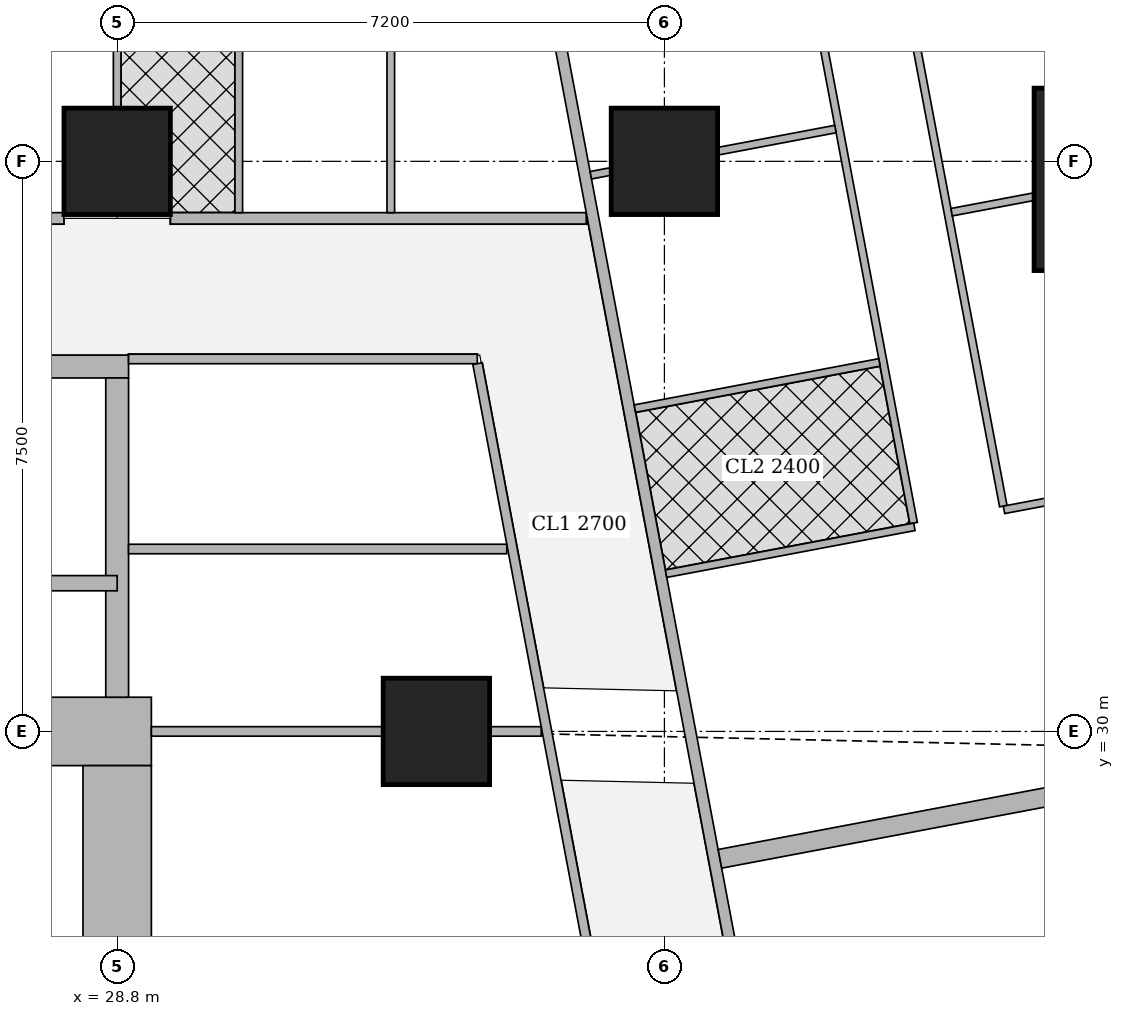
"""IFC4 building model, lengths in metres.
Left out: names, types, materials, properties, quantities, classifications, styles, units other than length and angle.
Written with IfcOpenShell. Run it as: python <this file> out.ifc"""

import sys

from ifc_helpers import new_model, si_unit, direction, frame, frame_2d, origin, origin_2d, place, context, subcontext, project, spatial, rectangle, extrude, element, fill, save


model = new_model("IFC4")
c1 = context("Model", 3, precision=1e-05, world=origin(), true_north=direction((0.0, 1.0)))
c2 = subcontext(c1, "Body", "Model", "MODEL_VIEW")
j1 = project(units=[si_unit("LENGTHUNIT", "METRE"), si_unit("PLANEANGLEUNIT", "RADIAN")], contexts=[c1])
p1 = place(None, origin())
s1 = spatial("IfcSite", under=j1, at=p1, CompositionType="ELEMENT")
p2 = place(p1, origin())
s2 = spatial("IfcBuilding", under=s1, at=p2, CompositionType="ELEMENT")
p3 = place(p2, frame((0.0, 0.0, 234.95)))
s3 = spatial("IfcBuildingStorey", under=s2, at=p3, CompositionType="ELEMENT", Elevation=234.95)
for number, where, z_axis, x_axis in (
    (1, (33.0, 30.0, 0.0), (0.0, 0.0, 1.0), (1.0, 0.0, 0.0)),
    (2, (28.8, 37.5, 0.0), (0.0, 0.0, 1.0), (1.0, 0.0, 0.0)),
    (3, (36.0, 37.5, 0.0), (0.0, 0.0, 1.0), (1.0, 0.0, 0.0)),
):
    element("IfcColumn", number, at=place(p3, frame(where, z_axis=z_axis, x_axis=x_axis)), inside=s3, PredefinedType="COLUMN", context=c2, shape_type="SweptSolid", body=[
        extrude(rectangle(XDim=1.4, YDim=1.4, at=origin_2d()), origin(), (0.0, 0.0, 1.0), 3.75),
    ])
p4 = place(p3, frame((42.064, 37.263, 0.0), z_axis=(0.0, 0.0, 1.0), x_axis=(1.0, 0.0, 0.0)))
e4 = element("IfcColumn", 4, at=p4, inside=s3, PredefinedType="COLUMN", context=c2, shape_type="SweptSolid", body=[
    extrude(rectangle(XDim=2.4, YDim=2.4, at=origin_2d()), origin(), (0.0, 0.0, 1.0), 3.75),
])
p5 = place(p3, frame((13.95, 30.0, 0.0), z_axis=(0.0, 0.0, 1.0), x_axis=(1.0, 0.0, 0.0)))
e5 = element("IfcWall", 5, at=p5, inside=s3, PredefinedType="SHEAR", context=c2, shape_type="SweptSolid", body=[
    extrude(rectangle(XDim=15.3, YDim=0.9, at=frame_2d((7.65, 0.0))), origin(), (0.0, 0.0, 1.0), 3.75),
])
p6 = place(p5, frame((4.45, 0.0, 0.0)))
e6 = element("IfcOpeningElement", 6, at=p6, cuts=e5, PredefinedType="OPENING", context=c2, shape_type="SweptSolid", body=[
    extrude(rectangle(XDim=1.8, YDim=2.1, at=frame_2d((0.9, 1.05))), frame((0.0, 0.46, 0.0), z_axis=(0.0, -1.0, 0.0), x_axis=(1.0, 0.0, 0.0)), (0.0, 0.0, 1.0), 0.92),
])
p7 = place(p5, frame((10.7, 0.0, 0.0)))
e7 = element("IfcOpeningElement", 7, at=p7, cuts=e5, PredefinedType="OPENING", context=c2, shape_type="SweptSolid", body=[
    extrude(rectangle(XDim=1.1, YDim=2.1, at=frame_2d((0.55, 1.05))), frame((0.0, 0.46, 0.0), z_axis=(0.0, -1.0, 0.0), x_axis=(1.0, 0.0, 0.0)), (0.0, 0.0, 1.0), 0.92),
])
p8 = place(p3, frame((28.8, 15.45, 0.0), z_axis=(0.0, 0.0, 1.0), x_axis=(0.0, 1.0, 0.0)))
e8 = element("IfcWall", 8, at=p8, inside=s3, PredefinedType="SHEAR", context=c2, shape_type="SweptSolid", body=[
    extrude(rectangle(XDim=14.1, YDim=0.9, at=frame_2d((7.05, 0.0))), origin(), (0.0, 0.0, 1.0), 3.75),
])
p9 = place(p3, frame((21.45, 34.8, 0.0), z_axis=(0.0, 0.0, 1.0), x_axis=(1.0, 0.0, 0.0)))
e9 = element("IfcWall", 9, at=p9, inside=s3, PredefinedType="SHEAR", context=c2, shape_type="SweptSolid", body=[
    extrude(rectangle(XDim=7.5, YDim=0.3, at=frame_2d((3.75, 0.0))), origin(), (0.0, 0.0, 1.0), 3.75),
])
p10 = place(p9, frame((0.5, 0.0, 0.0)))
e10 = element("IfcOpeningElement", 10, at=p10, cuts=e9, PredefinedType="OPENING", context=c2, shape_type="SweptSolid", body=[
    extrude(rectangle(XDim=1.1, YDim=2.1, at=frame_2d((0.55, 1.05))), frame((0.0, 0.16, 0.0), z_axis=(0.0, -1.0, 0.0), x_axis=(1.0, 0.0, 0.0)), (0.0, 0.0, 1.0), 0.32),
])
p11 = place(p3, frame((28.8, 30.45, 0.0), z_axis=(0.0, 0.0, 1.0), x_axis=(0.0, 1.0, 0.0)))
e11 = element("IfcWall", 11, at=p11, inside=s3, PredefinedType="SHEAR", context=c2, shape_type="SweptSolid", body=[
    extrude(rectangle(XDim=4.2, YDim=0.3, at=frame_2d((2.1, 0.0))), origin(), (0.0, 0.0, 1.0), 3.75),
])
p12 = place(p3, frame((22.301, 36.75, 0.0), z_axis=(0.0, 0.0, 1.0), x_axis=(1.0, 0.0, 0.0)))
e12 = element("IfcWall", 12, at=p12, inside=s3, PredefinedType="SOLIDWALL", context=c2, shape_type="SweptSolid", body=[
    extrude(rectangle(XDim=5.798, YDim=0.15, at=frame_2d((2.899, 0.0))), origin(), (0.0, 0.0, 1.0), 3.5),
])
p13 = place(p12, frame((0.799, 0.0, 0.0)))
e13 = element("IfcOpeningElement", 13, at=p13, cuts=e12, PredefinedType="OPENING", context=c2, shape_type="SweptSolid", body=[
    extrude(rectangle(XDim=1.0, YDim=2.1, at=frame_2d((0.5, 1.05))), frame((0.0, 0.085, 0.0), z_axis=(0.0, -1.0, 0.0), x_axis=(1.0, 0.0, 0.0)), (0.0, 0.0, 1.0), 0.17),
])
p14 = place(p3, frame((29.501, 36.75, 0.0), z_axis=(0.0, 0.0, 1.0), x_axis=(1.0, 0.0, 0.0)))
e14 = element("IfcWall", 14, at=p14, inside=s3, PredefinedType="SOLIDWALL", context=c2, shape_type="SweptSolid", body=[
    extrude(rectangle(XDim=5.471, YDim=0.15, at=frame_2d((2.735, 0.0))), origin(), (0.0, 0.0, 1.0), 3.5),
])
p15 = place(p3, frame((33.933, 42.73, 0.0), z_axis=(0.0, 0.0, 1.0), x_axis=(0.185595417643, -0.982626246825, 0.0)))
e15 = element("IfcWall", 15, at=p15, inside=s3, PredefinedType="SOLIDWALL", context=c2, shape_type="SweptSolid", body=[
    extrude(rectangle(XDim=41.051, YDim=0.15, at=frame_2d((20.525, 0.0))), origin(), (0.0, 0.0, 1.0), 2.5),
])
p16 = place(p15, frame((12.266, 0.0, 0.0)))
e16 = element("IfcOpeningElement", 16, at=p16, cuts=e15, PredefinedType="OPENING", context=c2, shape_type="SweptSolid", body=[
    extrude(rectangle(XDim=1.0, YDim=2.1, at=frame_2d((0.5, 1.05))), frame((0.0, 0.085, 0.0), z_axis=(0.0, -1.0, 0.0), x_axis=(1.0, 0.0, 0.0)), (0.0, 0.0, 1.0), 0.17),
])
p17 = place(p15, frame((16.082, 0.0, 0.0)))
e17 = element("IfcOpeningElement", 17, at=p17, cuts=e15, PredefinedType="OPENING", context=c2, shape_type="SweptSolid", body=[
    extrude(rectangle(XDim=1.0, YDim=2.1, at=frame_2d((0.5, 1.05))), frame((0.0, 0.085, 0.0), z_axis=(0.0, -1.0, 0.0), x_axis=(1.0, 0.0, 0.0)), (0.0, 0.0, 1.0), 0.17),
])
p18 = place(p15, frame((30.862, 0.0, 0.0)))
e18 = element("IfcOpeningElement", 18, at=p18, cuts=e15, PredefinedType="OPENING", context=c2, shape_type="SweptSolid", body=[
    extrude(rectangle(XDim=1.0, YDim=2.1, at=frame_2d((0.5, 1.05))), frame((0.0, 0.085, 0.0), z_axis=(0.0, -1.0, 0.0), x_axis=(1.0, 0.0, 0.0)), (0.0, 0.0, 1.0), 0.17),
])
p19 = place(p3, frame((38.764, 41.941, 0.0), z_axis=(0.0, 0.0, 1.0), x_axis=(0.185548572312, -0.982635093671, 0.0)))
e19 = element("IfcWall", 19, at=p19, inside=s3, PredefinedType="PARTITIONING", context=c2, shape_type="SweptSolid", body=[
    extrude(rectangle(XDim=9.135, YDim=0.1, at=frame_2d((4.568, 0.0))), origin(), (0.0, 0.0, 1.0), 3.5),
])
p20 = place(p19, frame((8.085, 0.0, 0.0)))
e20 = element("IfcOpeningElement", 20, at=p20, cuts=e19, PredefinedType="OPENING", context=c2, shape_type="SweptSolid", body=[
    extrude(rectangle(XDim=0.9, YDim=2.1, at=frame_2d((0.45, 1.05))), frame((0.0, 0.06, 0.0), z_axis=(0.0, -1.0, 0.0), x_axis=(1.0, 0.0, 0.0)), (0.0, 0.0, 1.0), 0.12),
])
p21 = place(p19, frame((3.7, 0.0, 0.0)))
e21 = element("IfcOpeningElement", 21, at=p21, cuts=e19, PredefinedType="OPENING", context=c2, shape_type="SweptSolid", body=[
    extrude(rectangle(XDim=0.9, YDim=2.1, at=frame_2d((0.45, 1.05))), frame((0.0, 0.06, 0.0), z_axis=(0.0, -1.0, 0.0), x_axis=(1.0, 0.0, 0.0)), (0.0, 0.0, 1.0), 0.12),
])
p22 = place(p3, frame((37.473, 42.309, 0.0), z_axis=(0.0, 0.0, 1.0), x_axis=(0.185491912953, -0.982645790827, 0.0)))
e22 = element("IfcWall", 22, at=p22, inside=s3, PredefinedType="PARTITIONING", context=c2, shape_type="SweptSolid", body=[
    extrude(rectangle(XDim=9.737, YDim=0.1, at=frame_2d((4.869, 0.0))), origin(), (0.0, 0.0, 1.0), 3.5),
])
p23 = place(p22, frame((8.232, 0.0, 0.0)))
e23 = element("IfcOpeningElement", 23, at=p23, cuts=e22, PredefinedType="OPENING", context=c2, shape_type="SweptSolid", body=[
    extrude(rectangle(XDim=0.9, YDim=2.1, at=frame_2d((0.45, 1.05))), frame((0.0, 0.06, 0.0), z_axis=(0.0, -1.0, 0.0), x_axis=(1.0, 0.0, 0.0)), (0.0, 0.0, 1.0), 0.12),
])
p24 = place(p22, frame((2.853, 0.0, 0.0)))
e24 = element("IfcOpeningElement", 24, at=p24, cuts=e22, PredefinedType="OPENING", context=c2, shape_type="SweptSolid", body=[
    extrude(rectangle(XDim=0.9, YDim=2.1, at=frame_2d((0.45, 1.05))), frame((0.0, 0.06, 0.0), z_axis=(0.0, -1.0, 0.0), x_axis=(1.0, 0.0, 0.0)), (0.0, 0.0, 1.0), 0.12),
])
p25 = place(p22, frame((5.564, 0.0, 0.0)))
e25 = element("IfcOpeningElement", 25, at=p25, cuts=e22, PredefinedType="OPENING", context=c2, shape_type="SweptSolid", body=[
    extrude(rectangle(XDim=0.9, YDim=2.1, at=frame_2d((0.45, 1.05))), frame((0.0, 0.06, 0.0), z_axis=(0.0, -1.0, 0.0), x_axis=(1.0, 0.0, 0.0)), (0.0, 0.0, 1.0), 0.12),
])
p26 = place(p3, frame((40.854, 37.034, 0.0), z_axis=(0.0, 0.0, 1.0), x_axis=(-0.982651678759, -0.185460718839, 0.0)))
e26 = element("IfcWall", 26, at=p26, inside=s3, PredefinedType="PARTITIONING", context=c2, shape_type="SweptSolid", body=[
    extrude(rectangle(XDim=1.094, YDim=0.1, at=frame_2d((0.547, 0.0))), origin(), (0.0, 0.0, 1.0), 3.5),
])
p27 = place(p3, frame((44.693, 33.713, 0.0), z_axis=(0.0, 0.0, 1.0), x_axis=(-0.982633535512, -0.185556823879, 0.0)))
e27 = element("IfcWall", 27, at=p27, inside=s3, PredefinedType="PARTITIONING", context=c2, shape_type="SweptSolid", body=[
    extrude(rectangle(XDim=4.3, YDim=0.1, at=frame_2d((2.15, 0.0))), origin(), (0.0, 0.0, 1.0), 2.05),
])
p28 = place(p3, frame((38.25, 37.925, 0.0), z_axis=(0.0, 0.0, 1.0), x_axis=(-0.982610209589, -0.185680305934, 0.0)))
e28 = element("IfcWall", 28, at=p28, inside=s3, PredefinedType="PARTITIONING", context=c2, shape_type="SweptSolid", body=[
    extrude(rectangle(XDim=1.567, YDim=0.1, at=frame_2d((0.784, 0.0))), origin(), (0.0, 0.0, 1.0), 3.5),
])
p29 = place(p3, frame((35.29, 37.366, 0.0), z_axis=(0.0, 0.0, 1.0), x_axis=(-0.982395465615, -0.18681313963, 0.0)))
e29 = element("IfcWall", 29, at=p29, inside=s3, PredefinedType="PARTITIONING", context=c2, shape_type="SweptSolid", body=[
    extrude(rectangle(XDim=0.263, YDim=0.1, at=frame_2d((0.131, 0.0))), origin(), (0.0, 0.0, 1.0), 3.5),
])
p30 = place(p3, frame((39.289, 32.692, 0.0), z_axis=(0.0, 0.0, 1.0), x_axis=(-0.982633623707, -0.185556356831, 0.0)))
e30 = element("IfcWall", 30, at=p30, inside=s3, PredefinedType="PARTITIONING", context=c2, shape_type="SweptSolid", body=[
    extrude(rectangle(XDim=3.325, YDim=0.1, at=frame_2d((1.663, 0.0))), origin(), (0.0, 0.0, 1.0), 3.5),
])
p31 = place(p3, frame((38.829, 34.855, 0.0), z_axis=(0.0, 0.0, 1.0), x_axis=(-0.982610347627, -0.185679575441, 0.0)))
e31 = element("IfcWall", 31, at=p31, inside=s3, PredefinedType="PARTITIONING", context=c2, shape_type="SweptSolid", body=[
    extrude(rectangle(XDim=3.274, YDim=0.1, at=frame_2d((1.637, 0.0))), origin(), (0.0, 0.0, 1.0), 3.5),
])
p32 = place(p3, frame((41.177, 29.164, 0.0), z_axis=(0.0, 0.0, 1.0), x_axis=(-0.982612837616, -0.185666398014, 0.0)))
e32 = element("IfcWall", 32, at=p32, inside=s3, PredefinedType="SOLIDWALL", context=c2, shape_type="SweptSolid", body=[
    extrude(rectangle(XDim=4.525, YDim=0.25, at=frame_2d((2.262, 0.0))), origin(), (0.0, 0.0, 1.0), 2.5),
])
p33 = place(p3, frame((28.8, 38.201, 0.0), z_axis=(0.0, 0.0, 1.0), x_axis=(0.0, 1.0, 0.0)))
e33 = element("IfcWall", 33, at=p33, inside=s3, PredefinedType="PARTITIONING", context=c2, shape_type="SweptSolid", body=[
    extrude(rectangle(XDim=1.899, YDim=0.1, at=frame_2d((0.95, 0.0))), origin(), (0.0, 0.0, 1.0), 3.5),
])
for number, where, z_axis, x_axis in (
    (34, (32.4, 36.825, 0.0), (0.0, 0.0, 1.0), (0.0, 1.0, 0.0)),
    (35, (30.4, 36.825, 0.0), (0.0, 0.0, 1.0), (0.0, 1.0, 0.0)),
):
    element("IfcWall", number, at=place(p3, frame(where, z_axis=z_axis, x_axis=x_axis)), inside=s3, PredefinedType="PARTITIONING", context=c2, shape_type="SweptSolid", body=[
        extrude(rectangle(XDim=3.275, YDim=0.1, at=frame_2d((1.638, 0.0))), origin(), (0.0, 0.0, 1.0), 3.5),
    ])
p34 = place(p3, frame((28.95, 34.9, 0.0), z_axis=(0.0, 0.0, 1.0), x_axis=(1.0, 0.0, 0.0)))
e36 = element("IfcWall", 36, at=p34, inside=s3, PredefinedType="PARTITIONING", context=c2, shape_type="SweptSolid", body=[
    extrude(rectangle(XDim=4.588, YDim=0.125, at=frame_2d((2.294, 0.0))), origin(), (0.0, 0.0, 1.0), 3.5),
])
p35 = place(p3, frame((38.202, 10.163, 0.0), z_axis=(0.0, 0.0, 1.0), x_axis=(-0.185610321132, 0.982623431783, 0.0)))
e37 = element("IfcWall", 37, at=p35, inside=s3, PredefinedType="PARTITIONING", context=c2, shape_type="SweptSolid", body=[
    extrude(rectangle(XDim=25.111, YDim=0.125, at=frame_2d((12.556, 0.0))), origin(), (0.0, 0.0, 1.0), 2.5),
])
p36 = place(p35, frame((0.708, 0.0, 0.0)))
e38 = element("IfcOpeningElement", 38, at=p36, cuts=e37, PredefinedType="OPENING", context=c2, shape_type="SweptSolid", body=[
    extrude(rectangle(XDim=1.0, YDim=2.1, at=frame_2d((0.5, 1.05))), frame((0.0, 0.073, 0.0), z_axis=(0.0, -1.0, 0.0), x_axis=(1.0, 0.0, 0.0)), (0.0, 0.0, 1.0), 0.145),
])
p37 = place(p35, frame((13.378, 0.0, 0.0)))
e39 = element("IfcOpeningElement", 39, at=p37, cuts=e37, PredefinedType="OPENING", context=c2, shape_type="SweptSolid", body=[
    extrude(rectangle(XDim=1.0, YDim=2.1, at=frame_2d((0.5, 1.05))), frame((0.0, 0.073, 0.0), z_axis=(0.0, -1.0, 0.0), x_axis=(1.0, 0.0, 0.0)), (0.0, 0.0, 1.0), 0.145),
])
p38 = place(p35, frame((21.15, 0.0, 0.0)))
e40 = element("IfcOpeningElement", 40, at=p38, cuts=e37, PredefinedType="OPENING", context=c2, shape_type="SweptSolid", body=[
    extrude(rectangle(XDim=1.0, YDim=2.1, at=frame_2d((0.5, 1.05))), frame((0.0, 0.073, 0.0), z_axis=(0.0, -1.0, 0.0), x_axis=(1.0, 0.0, 0.0)), (0.0, 0.0, 1.0), 0.145),
])
p39 = place(p35, frame((23.453, 0.0, 0.0)))
e41 = element("IfcOpeningElement", 41, at=p39, cuts=e37, PredefinedType="OPENING", context=c2, shape_type="SweptSolid", body=[
    extrude(rectangle(XDim=1.0, YDim=2.1, at=frame_2d((0.5, 1.05))), frame((0.0, 0.073, 0.0), z_axis=(0.0, -1.0, 0.0), x_axis=(1.0, 0.0, 0.0)), (0.0, 0.0, 1.0), 0.145),
])
p40 = place(p3, frame((29.25, 30.0, 0.0), z_axis=(0.0, 0.0, 1.0), x_axis=(1.0, 0.0, 0.0)))
e42 = element("IfcWall", 42, at=p40, inside=s3, PredefinedType="PARTITIONING", context=c2, shape_type="SweptSolid", body=[
    extrude(rectangle(XDim=3.049, YDim=0.125, at=frame_2d((1.524, 0.0))), origin(), (0.0, 0.0, 1.0), 3.5),
])
p41 = place(p3, frame((33.701, 30.0, 0.0), z_axis=(0.0, 0.0, 1.0), x_axis=(1.0, 0.0, 0.0)))
e43 = element("IfcWall", 43, at=p41, inside=s3, PredefinedType="PARTITIONING", context=c2, shape_type="SweptSolid", body=[
    extrude(rectangle(XDim=0.678, YDim=0.125, at=frame_2d((0.339, 0.0))), origin(), (0.0, 0.0, 1.0), 2.5),
])
p42 = place(p3, frame((28.95, 32.4, 0.0), z_axis=(0.0, 0.0, 1.0), x_axis=(1.0, 0.0, 0.0)))
e44 = element("IfcWall", 44, at=p42, inside=s3, PredefinedType="PARTITIONING", context=c2, shape_type="SweptSolid", body=[
    extrude(rectangle(XDim=4.976, YDim=0.125, at=frame_2d((2.488, 0.0))), origin(), (0.0, 0.0, 1.0), 3.5),
])
p43 = place(p3, frame((23.0, 31.95, 0.0), z_axis=(0.0, 0.0, 1.0), x_axis=(1.0, 0.0, 0.0)))
e45 = element("IfcWall", 45, at=p43, inside=s3, PredefinedType="SHEAR", context=c2, shape_type="SweptSolid", body=[
    extrude(rectangle(XDim=5.8, YDim=0.2, at=frame_2d((2.9, 0.0))), origin(), (0.0, 0.0, 1.0), 3.75),
])
p44 = place(p20, origin())
e46 = element("IfcDoor", 46, at=p44, inside=s3, OperationType="SINGLE_SWING_RIGHT", PredefinedType="DOOR", context=c2, shape_type="SweptSolid", body=[
    extrude(rectangle(XDim=0.9, YDim=2.1, at=frame_2d((0.45, 1.05))), frame((0.0, 0.025, 0.0), z_axis=(0.0, -1.0, 0.0), x_axis=(1.0, 0.0, 0.0)), (0.0, 0.0, 1.0), 0.05),
])
fill(e20, e46)
p45 = place(p21, origin())
e47 = element("IfcDoor", 47, at=p45, inside=s3, OperationType="SINGLE_SWING_RIGHT", PredefinedType="DOOR", context=c2, shape_type="SweptSolid", body=[
    extrude(rectangle(XDim=0.9, YDim=2.1, at=frame_2d((0.45, 1.05))), frame((0.0, 0.025, 0.0), z_axis=(0.0, -1.0, 0.0), x_axis=(1.0, 0.0, 0.0)), (0.0, 0.0, 1.0), 0.05),
])
fill(e21, e47)
p46 = place(p23, origin())
e48 = element("IfcDoor", 48, at=p46, inside=s3, OperationType="SINGLE_SWING_LEFT", PredefinedType="DOOR", context=c2, shape_type="SweptSolid", body=[
    extrude(rectangle(XDim=0.9, YDim=2.1, at=frame_2d((0.45, 1.05))), frame((0.0, 0.025, 0.0), z_axis=(0.0, -1.0, 0.0), x_axis=(1.0, 0.0, 0.0)), (0.0, 0.0, 1.0), 0.05),
])
fill(e23, e48)
p47 = place(p24, origin())
e49 = element("IfcDoor", 49, at=p47, inside=s3, OperationType="SINGLE_SWING_RIGHT", PredefinedType="DOOR", context=c2, shape_type="SweptSolid", body=[
    extrude(rectangle(XDim=0.9, YDim=2.1, at=frame_2d((0.45, 1.05))), frame((0.0, 0.025, 0.0), z_axis=(0.0, -1.0, 0.0), x_axis=(1.0, 0.0, 0.0)), (0.0, 0.0, 1.0), 0.05),
])
fill(e24, e49)
p48 = place(p25, origin())
e50 = element("IfcDoor", 50, at=p48, inside=s3, OperationType="SINGLE_SWING_RIGHT", PredefinedType="DOOR", context=c2, shape_type="SweptSolid", body=[
    extrude(rectangle(XDim=0.9, YDim=2.1, at=frame_2d((0.45, 1.05))), frame((0.0, 0.025, 0.0), z_axis=(0.0, -1.0, 0.0), x_axis=(1.0, 0.0, 0.0)), (0.0, 0.0, 1.0), 0.05),
])
fill(e25, e50)
p49 = place(p16, origin())
e51 = element("IfcDoor", 51, at=p49, inside=s3, OperationType="SINGLE_SWING_RIGHT", PredefinedType="DOOR", context=c2, shape_type="SweptSolid", body=[
    extrude(rectangle(XDim=1.0, YDim=2.1, at=frame_2d((0.5, 1.05))), frame((0.0, 0.025, 0.0), z_axis=(0.0, -1.0, 0.0), x_axis=(1.0, 0.0, 0.0)), (0.0, 0.0, 1.0), 0.05),
])
fill(e16, e51)
p50 = place(p38, origin())
e52 = element("IfcDoor", 52, at=p50, inside=s3, OperationType="SINGLE_SWING_RIGHT", PredefinedType="DOOR", context=c2, shape_type="SweptSolid", body=[
    extrude(rectangle(XDim=1.0, YDim=2.1, at=frame_2d((0.5, 1.05))), frame((0.0, 0.025, 0.0), z_axis=(0.0, -1.0, 0.0), x_axis=(1.0, 0.0, 0.0)), (0.0, 0.0, 1.0), 0.05),
])
fill(e40, e52)
p51 = place(p39, origin())
e53 = element("IfcDoor", 53, at=p51, inside=s3, OperationType="SINGLE_SWING_RIGHT", PredefinedType="DOOR", context=c2, shape_type="SweptSolid", body=[
    extrude(rectangle(XDim=1.0, YDim=2.1, at=frame_2d((0.5, 1.05))), frame((0.0, 0.025, 0.0), z_axis=(0.0, -1.0, 0.0), x_axis=(1.0, 0.0, 0.0)), (0.0, 0.0, 1.0), 0.05),
])
fill(e41, e53)
save(model, sys.argv[1])
